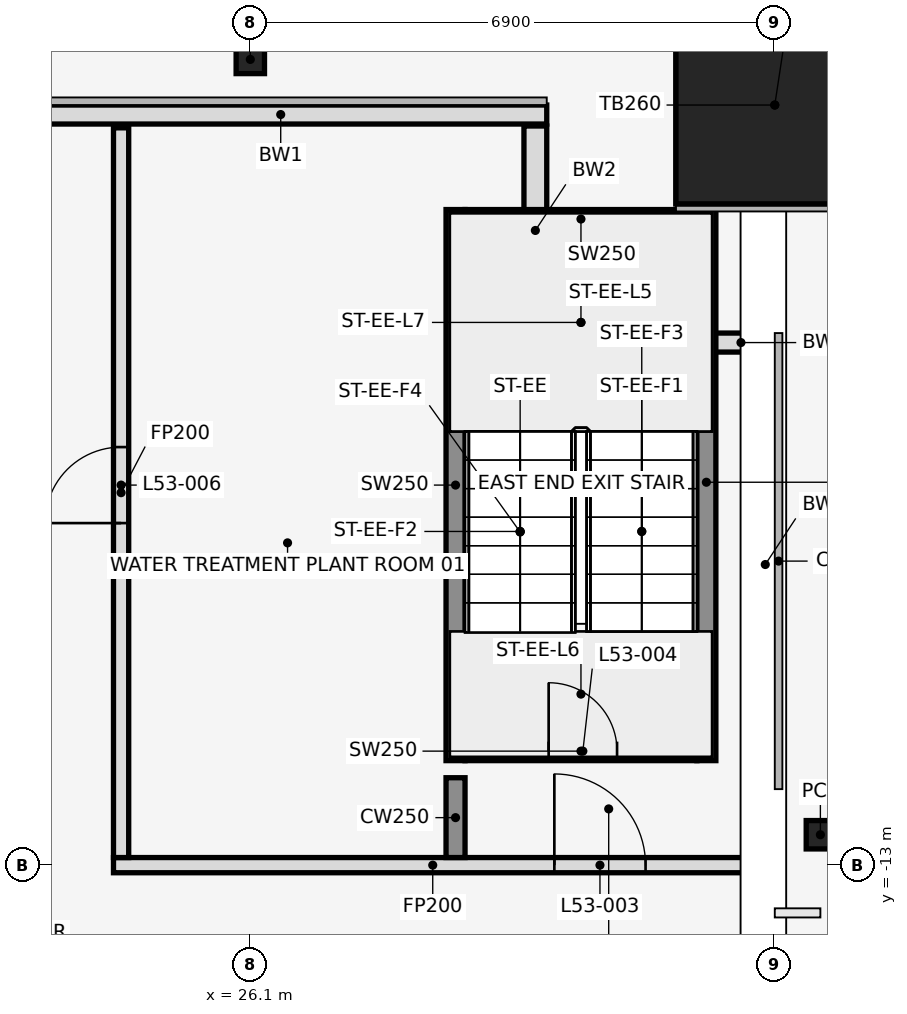
"""IFC4 building model, lengths in metres.
Left out: names, types, materials, properties, quantities, classifications, styles, units other than length and angle.
Written with IfcOpenShell. Run it as: python <this file> out.ifc"""

import sys

from ifc_helpers import new_model, si_unit, direction, frame, frame_2d, origin, origin_2d, place, context, subcontext, project, spatial, rectangle, hollow_rectangle, i_section, extrude, element, fill, save


model = new_model("IFC4")
c1 = context("Model", 3, precision=1e-05, world=origin(), true_north=direction((0.0, 1.0)))
c2 = subcontext(c1, "Body", "Model", "MODEL_VIEW")
j1 = project(units=[si_unit("LENGTHUNIT", "METRE"), si_unit("PLANEANGLEUNIT", "RADIAN")], contexts=[c1])
p1 = place(None, origin())
s1 = spatial("IfcSite", under=j1, at=p1, CompositionType="ELEMENT")
p2 = place(p1, origin())
s2 = spatial("IfcBuilding", under=s1, at=p2, CompositionType="ELEMENT")
p3 = place(p2, frame((0.0, 0.0, 236.0)))
s3 = spatial("IfcBuildingStorey", under=s2, at=p3, CompositionType="ELEMENT", Elevation=236.0)
p4 = place(p3, frame((26.1, -2.4, 0.0), z_axis=(0.0, 0.0, 1.0), x_axis=(1.0, 0.0, 0.0)))
e1 = element("IfcColumn", 1, at=p4, inside=s3, PredefinedType="COLUMN", context=c2, shape_type="SweptSolid", body=[
    extrude(i_section(OverallWidth=0.373, OverallDepth=0.373, WebThickness=0.016, FlangeThickness=0.026, at=origin_2d()), origin(), (0.0, 0.0, 1.0), 5.4),
])
p5 = place(p3, frame((33.0, -3.0, 0.0), z_axis=(0.0, 0.0, 1.0), x_axis=(1.0, 0.0, 0.0)))
e2 = element("IfcColumn", 2, at=p5, inside=s3, PredefinedType="COLUMN", context=c2, shape_type="SweptSolid", body=[
    extrude(hollow_rectangle(XDim=2.6, YDim=2.6, WallThickness=0.07, at=origin_2d()), origin(), (0.0, 0.0, 1.0), 4.98),
])
p6 = place(p3, frame((33.6, -12.6, 0.0), z_axis=(0.0, 0.0, 1.0), x_axis=(1.0, 0.0, 0.0)))
e3 = element("IfcColumn", 3, at=p6, inside=s3, PredefinedType="COLUMN", context=c2, shape_type="SweptSolid", body=[
    extrude(i_section(OverallWidth=0.373, OverallDepth=0.373, WebThickness=0.016, FlangeThickness=0.026, at=origin_2d()), origin(), (0.0, 0.0, 1.0), 5.4),
])
p7 = place(p3, frame((33.0, -3.0, 4.98), z_axis=(0.0, 0.0, 1.0), x_axis=(1.0, 0.0, 0.0)))
e4 = element("IfcColumn", 4, at=p7, inside=s3, PredefinedType="COLUMN", context=c2, shape_type="SweptSolid", body=[
    extrude(rectangle(XDim=2.6, YDim=2.6, at=origin_2d()), origin(), (0.0, 0.0, 1.0), 0.42),
])
p8 = place(p3, frame((32.85, -24.256, 0.0), z_axis=(0.0, 0.0, 1.0), x_axis=(0.0, 1.0, 0.0)))
e5 = element("IfcWall", 5, at=p8, inside=s3, PredefinedType="STANDARD", context=c2, shape_type="SweptSolid", body=[
    extrude(rectangle(XDim=12.256, YDim=0.3, at=frame_2d((6.128, 0.0))), origin(), (0.0, 0.0, 1.0), 4.338),
])
p9 = place(p3, frame((29.85, -6.024, 0.0), z_axis=(0.0, 0.0, 1.0), x_axis=(0.0, 1.0, 0.0)))
e6 = element("IfcWall", 6, at=p9, inside=s3, PredefinedType="STANDARD", context=c2, shape_type="SweptSolid", body=[
    extrude(rectangle(XDim=2.748, YDim=0.3, at=frame_2d((1.374, 0.0))), origin(), (0.0, 0.0, 1.0), 5.25),
])
p10 = place(p3, frame((32.875, -12.09, 0.0), z_axis=(0.0, 0.0, 1.0), x_axis=(0.0, 1.0, 0.0)))
e7 = element("IfcWall", 7, at=p10, inside=s3, PredefinedType="STANDARD", context=c2, shape_type="SweptSolid", body=[
    extrude(rectangle(XDim=6.09, YDim=0.25, at=frame_2d((3.045, 0.0))), origin(), (0.0, 0.0, 1.0), 5.25),
])
p11 = place(p3, frame((33.0, -6.125, 0.0), z_axis=(0.0, 0.0, 1.0), x_axis=(-1.0, 0.0, 0.0)))
e8 = element("IfcWall", 8, at=p11, inside=s3, PredefinedType="STANDARD", context=c2, shape_type="SweptSolid", body=[
    extrude(rectangle(XDim=0.89, YDim=0.25, at=frame_2d((0.445, 0.0))), origin(), (0.0, 0.0, 1.0), 5.25),
])
p12 = place(p3, frame((30.0, -3.125, 0.0), z_axis=(0.0, 0.0, 1.0), x_axis=(-1.0, 0.0, 0.0)))
e9 = element("IfcWall", 9, at=p12, inside=s3, PredefinedType="STANDARD", context=c2, shape_type="SweptSolid", body=[
    extrude(rectangle(XDim=7.0, YDim=0.25, at=frame_2d((3.5, 0.0))), origin(), (0.0, 0.0, 1.0), 5.25),
])
p13 = place(p3, frame((28.8, -11.625, 0.0), z_axis=(0.0, 0.0, 1.0), x_axis=(0.0, 1.0, 0.0)))
e10 = element("IfcWall", 10, at=p13, inside=s3, PredefinedType="SHEAR", context=c2, shape_type="SweptSolid", body=[
    extrude(rectangle(XDim=7.25, YDim=0.25, at=frame_2d((3.625, 0.0))), origin(), (0.0, 0.0, 1.0), 5.4),
])
p14 = place(p3, frame((32.1, -11.625, 0.0), z_axis=(0.0, 0.0, 1.0), x_axis=(0.0, 1.0, 0.0)))
e11 = element("IfcWall", 11, at=p14, inside=s3, PredefinedType="SHEAR", context=c2, shape_type="SweptSolid", body=[
    extrude(rectangle(XDim=7.325, YDim=0.25, at=frame_2d((3.663, 0.0))), origin(), (0.0, 0.0, 1.0), 5.4),
])
p15 = place(p3, frame((28.925, -11.5, 0.0), z_axis=(0.0, 0.0, 1.0), x_axis=(1.0, 0.0, 0.0)))
e12 = element("IfcWall", 12, at=p15, inside=s3, PredefinedType="SHEAR", context=c2, shape_type="SweptSolid", body=[
    extrude(rectangle(XDim=3.05, YDim=0.25, at=frame_2d((1.525, 0.0))), origin(), (0.0, 0.0, 1.0), 5.4),
])
p16 = place(p15, frame((1.1, 0.0, 0.0)))
e13 = element("IfcOpeningElement", 13, at=p16, cuts=e12, PredefinedType="OPENING", context=c2, shape_type="SweptSolid", body=[
    extrude(rectangle(XDim=0.9, YDim=2.1, at=frame_2d((0.45, 1.05))), frame((0.0, 0.137, 0.0), z_axis=(0.0, -1.0, 0.0), x_axis=(1.0, 0.0, 0.0)), (0.0, 0.0, 1.0), 0.274),
])
p17 = place(p3, frame((28.925, -4.5, 0.0), z_axis=(0.0, 0.0, 1.0), x_axis=(1.0, 0.0, 0.0)))
e14 = element("IfcWall", 14, at=p17, inside=s3, PredefinedType="SHEAR", context=c2, shape_type="SweptSolid", body=[
    extrude(rectangle(XDim=3.05, YDim=0.25, at=frame_2d((1.525, 0.0))), origin(), (0.0, 0.0, 1.0), 5.4),
])
p18 = place(p3, frame((24.3, -13.0, 0.0), z_axis=(0.0, 0.0, 1.0), x_axis=(1.0, 0.0, 0.0)))
e15 = element("IfcWall", 15, at=p18, inside=s3, PredefinedType="PARTITIONING", context=c2, shape_type="SweptSolid", body=[
    extrude(rectangle(XDim=8.4, YDim=0.2, at=frame_2d((4.2, 0.0))), origin(), (0.0, 0.0, 1.0), 4.318),
])
p19 = place(p18, frame((5.8, 0.0, 0.0)))
e16 = element("IfcOpeningElement", 16, at=p19, cuts=e15, PredefinedType="OPENING", context=c2, shape_type="SweptSolid", body=[
    extrude(rectangle(XDim=1.2, YDim=2.1, at=frame_2d((0.6, 1.05))), frame((0.0, 0.112, 0.0), z_axis=(0.0, -1.0, 0.0), x_axis=(1.0, 0.0, 0.0)), (0.0, 0.0, 1.0), 0.224),
])
p20 = place(p3, frame((24.4, -12.9, 0.0), z_axis=(0.0, 0.0, 1.0), x_axis=(0.0, 1.0, 0.0)))
e17 = element("IfcWall", 17, at=p20, inside=s3, PredefinedType="PARTITIONING", context=c2, shape_type="SweptSolid", body=[
    extrude(rectangle(XDim=9.6, YDim=0.2, at=frame_2d((4.8, 0.0))), origin(), (0.0, 0.0, 1.0), 4.318),
])
p21 = place(p20, frame((4.4, 0.0, 0.0)))
e18 = element("IfcOpeningElement", 18, at=p21, cuts=e17, PredefinedType="OPENING", context=c2, shape_type="SweptSolid", body=[
    extrude(rectangle(XDim=1.0, YDim=2.1, at=frame_2d((0.5, 1.05))), frame((0.0, 0.112, 0.0), z_axis=(0.0, -1.0, 0.0), x_axis=(1.0, 0.0, 0.0)), (0.0, 0.0, 1.0), 0.224),
])
p22 = place(p3, frame((28.8, -12.9, 0.0), z_axis=(0.0, 0.0, 1.0), x_axis=(0.0, 1.0, 0.0)))
e19 = element("IfcWall", 19, at=p22, inside=s3, PredefinedType="SHEAR", context=c2, shape_type="SweptSolid", body=[
    extrude(rectangle(XDim=1.05, YDim=0.25, at=frame_2d((0.525, 0.0))), origin(), (0.0, 0.0, 1.0), 5.4),
])
p23 = place(p19, origin())
e20 = element("IfcDoor", 20, at=p23, inside=s3, OperationType="SINGLE_SWING_RIGHT", PredefinedType="DOOR", context=c2, shape_type="SweptSolid", body=[
    extrude(rectangle(XDim=1.2, YDim=2.1, at=frame_2d((0.6, 1.05))), frame((0.0, 0.025, 0.0), z_axis=(0.0, -1.0, 0.0), x_axis=(1.0, 0.0, 0.0)), (0.0, 0.0, 1.0), 0.05),
])
fill(e16, e20)
p24 = place(p16, origin())
e21 = element("IfcDoor", 21, at=p24, inside=s3, OperationType="SINGLE_SWING_LEFT", PredefinedType="DOOR", context=c2, shape_type="SweptSolid", body=[
    extrude(rectangle(XDim=0.9, YDim=2.1, at=frame_2d((0.45, 1.05))), frame((0.0, 0.025, 0.0), z_axis=(0.0, -1.0, 0.0), x_axis=(1.0, 0.0, 0.0)), (0.0, 0.0, 1.0), 0.05),
])
fill(e13, e21)
p25 = place(p21, frame((1.0, 0.0, 0.0), z_axis=(0.0, 0.0, 1.0), x_axis=(-1.0, 0.0, 0.0)))
e22 = element("IfcDoor", 22, at=p25, inside=s3, OperationType="SINGLE_SWING_RIGHT", PredefinedType="DOOR", context=c2, shape_type="SweptSolid", body=[
    extrude(rectangle(XDim=1.0, YDim=2.1, at=frame_2d((0.5, 1.05))), frame((0.0, 0.025, 0.0), z_axis=(0.0, -1.0, 0.0), x_axis=(1.0, 0.0, 0.0)), (0.0, 0.0, 1.0), 0.05),
])
fill(e18, e22)
save(model, sys.argv[1])
